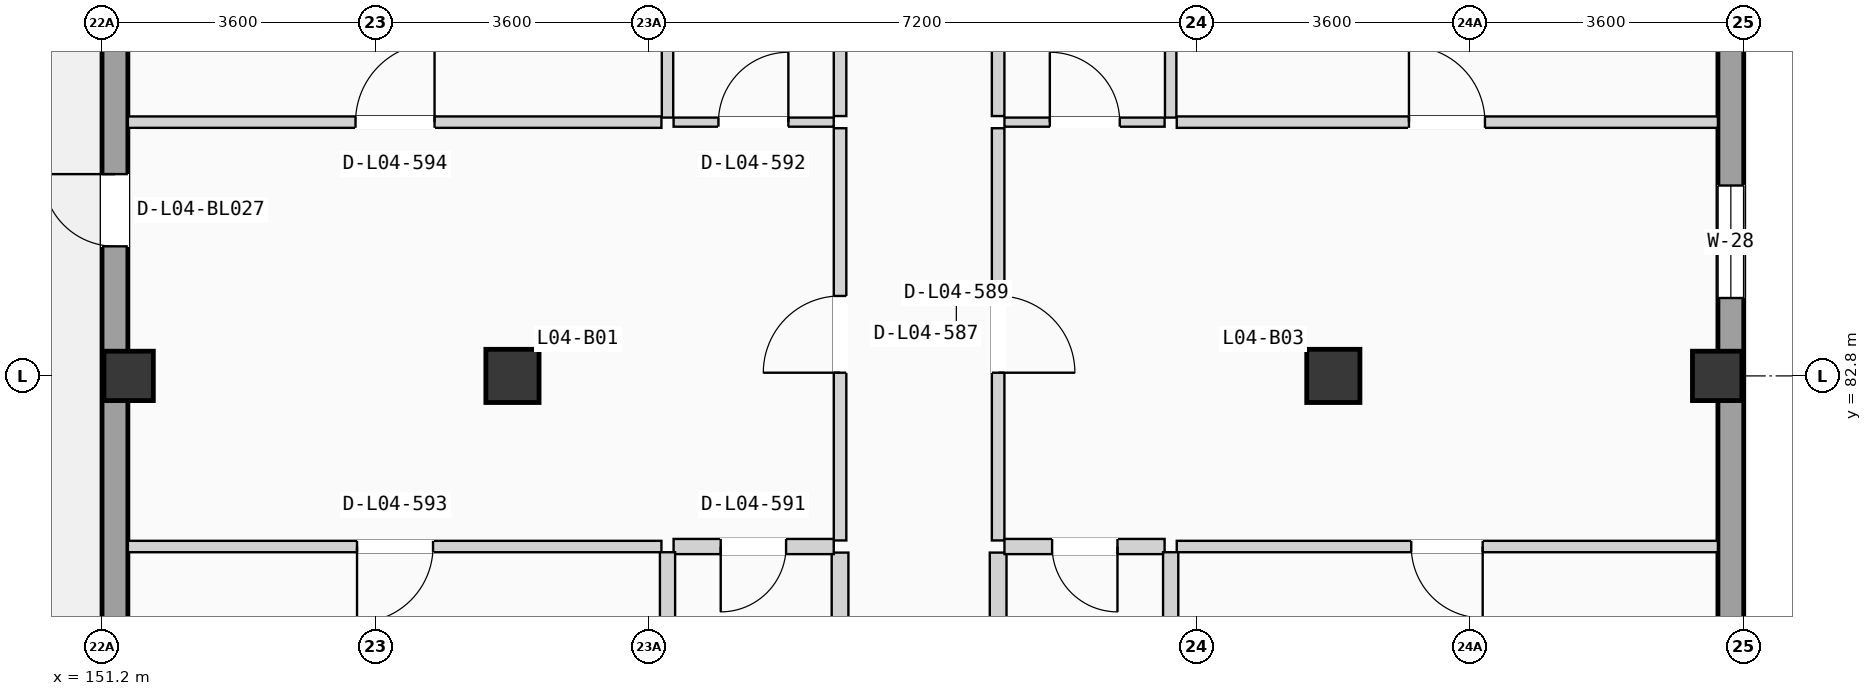
"""IFC4 building model, lengths in metres.
Left out: names, types, materials, properties, quantities, classifications, styles, units other than length and angle.
Written with IfcOpenShell. Run it as: python <this file> out.ifc"""

import sys

from ifc_helpers import new_model, si_unit, direction, frame, frame_2d, origin, origin_2d, place, context, subcontext, project, spatial, rectangle, extrude, element, fill, save


model = new_model("IFC4")
c1 = context("Model", 3, precision=1e-05, world=origin(), true_north=direction((0.0, 1.0)))
c2 = subcontext(c1, "Body", "Model", "MODEL_VIEW")
j1 = project(units=[si_unit("LENGTHUNIT", "METRE"), si_unit("PLANEANGLEUNIT", "RADIAN")], contexts=[c1])
p1 = place(None, origin())
s1 = spatial("IfcSite", under=j1, at=p1, CompositionType="ELEMENT")
p2 = place(p1, origin())
s2 = spatial("IfcBuilding", under=s1, at=p2, CompositionType="ELEMENT")
p3 = place(p2, frame((0.0, 0.0, 15.225)))
s3 = spatial("IfcBuildingStorey", under=s2, at=p3, CompositionType="ELEMENT", Elevation=15.225)
p4 = place(p3, frame((151.55, 82.8, 0.0), z_axis=(0.0, 0.0, 1.0), x_axis=(1.0, 0.0, 0.0)))
e1 = element("IfcColumn", 1, at=p4, inside=s3, PredefinedType="COLUMN", context=c2, shape_type="SweptSolid", body=[
    extrude(rectangle(XDim=0.65, YDim=0.65, at=origin_2d()), origin(), (0.0, 0.0, 1.0), 3.15),
])
for number, where, z_axis, x_axis in (
    (2, (156.6, 82.8, 0.0), (0.0, 0.0, 1.0), (1.0, 0.0, 0.0)),
    (3, (167.4, 82.8, 0.0), (0.0, 0.0, 1.0), (1.0, 0.0, 0.0)),
):
    element("IfcColumn", number, at=place(p3, frame(where, z_axis=z_axis, x_axis=x_axis)), inside=s3, PredefinedType="COLUMN", context=c2, shape_type="SweptSolid", body=[
        extrude(rectangle(XDim=0.7, YDim=0.7, at=origin_2d()), origin(), (0.0, 0.0, 1.0), 3.15),
    ])
p5 = place(p3, frame((172.45, 82.8, 0.0), z_axis=(0.0, 0.0, 1.0), x_axis=(1.0, 0.0, 0.0)))
e4 = element("IfcColumn", 4, at=p5, inside=s3, PredefinedType="COLUMN", context=c2, shape_type="SweptSolid", body=[
    extrude(rectangle(XDim=0.65, YDim=0.65, at=origin_2d()), origin(), (0.0, 0.0, 1.0), 3.15),
])
p6 = place(p3, frame((151.37, 68.74, 0.0), z_axis=(0.0, 0.0, 1.0), x_axis=(0.0, 1.0, 0.0)))
e5 = element("IfcWall", 5, at=p6, inside=s3, PredefinedType="SOLIDWALL", context=c2, shape_type="SweptSolid", body=[
    extrude(rectangle(XDim=49.72, YDim=0.34, at=frame_2d((24.86, 0.0))), origin(), (0.0, 0.0, 1.0), 2.89),
])
p7 = place(p6, frame((15.765, 0.0, 0.0)))
e6 = element("IfcOpeningElement", 6, at=p7, cuts=e5, PredefinedType="OPENING", context=c2, shape_type="SweptSolid", body=[
    extrude(rectangle(XDim=0.95, YDim=2.15, at=frame_2d((0.475, 1.075))), frame((0.0, 0.18, 0.0), z_axis=(0.0, -1.0, 0.0), x_axis=(1.0, 0.0, 0.0)), (0.0, 0.0, 1.0), 0.36),
])
p8 = place(p6, frame((8.823, 0.0, 0.555)))
e7 = element("IfcOpeningElement", 7, at=p8, cuts=e5, PredefinedType="OPENING", context=c2, shape_type="SweptSolid", body=[
    extrude(rectangle(XDim=1.35, YDim=1.65, at=frame_2d((0.675, 0.825))), frame((0.0, 0.18, 0.0), z_axis=(0.0, -1.0, 0.0), x_axis=(1.0, 0.0, 0.0)), (0.0, 0.0, 1.0), 0.36),
])
p9 = place(p6, frame((18.76, 0.0, 0.85)))
e8 = element("IfcOpeningElement", 8, at=p9, cuts=e5, PredefinedType="OPENING", context=c2, shape_type="SweptSolid", body=[
    extrude(rectangle(XDim=0.95, YDim=1.2, at=frame_2d((0.475, 0.6))), frame((0.0, 0.18, 0.0), z_axis=(0.0, -1.0, 0.0), x_axis=(1.0, 0.0, 0.0)), (0.0, 0.0, 1.0), 0.36),
])
p10 = place(p6, frame((32.345, 0.0, 0.0)))
e9 = element("IfcOpeningElement", 9, at=p10, cuts=e5, PredefinedType="OPENING", context=c2, shape_type="SweptSolid", body=[
    extrude(rectangle(XDim=1.08, YDim=2.18, at=frame_2d((0.54, 1.09))), frame((0.0, 0.18, 0.0), z_axis=(0.0, -1.0, 0.0), x_axis=(1.0, 0.0, 0.0)), (0.0, 0.0, 1.0), 0.36),
])
p11 = place(p6, frame((24.422, 0.0, 0.9)))
e10 = element("IfcOpeningElement", 10, at=p11, cuts=e5, PredefinedType="OPENING", context=c2, shape_type="SweptSolid", body=[
    extrude(rectangle(XDim=1.48, YDim=1.2, at=frame_2d((0.74, 0.6))), frame((0.0, 0.18, 0.0), z_axis=(0.0, -1.0, 0.0), x_axis=(1.0, 0.0, 0.0)), (0.0, 0.0, 1.0), 0.36),
])
p12 = place(p6, frame((38.455, 0.0, 0.855)))
e11 = element("IfcOpeningElement", 11, at=p12, cuts=e5, PredefinedType="OPENING", context=c2, shape_type="SweptSolid", body=[
    extrude(rectangle(XDim=1.48, YDim=1.35, at=frame_2d((0.74, 0.675))), frame((0.0, 0.18, 0.0), z_axis=(0.0, -1.0, 0.0), x_axis=(1.0, 0.0, 0.0)), (0.0, 0.0, 1.0), 0.36),
])
p13 = place(p3, frame((172.63, 68.74, 0.0), z_axis=(0.0, 0.0, 1.0), x_axis=(0.0, 1.0, 0.0)))
e12 = element("IfcWall", 12, at=p13, inside=s3, PredefinedType="SOLIDWALL", context=c2, shape_type="SweptSolid", body=[
    extrude(rectangle(XDim=49.72, YDim=0.34, at=frame_2d((24.86, 0.0))), origin(), (0.0, 0.0, 1.0), 2.89),
])
p14 = place(p13, frame((15.085, 0.0, 0.705)))
e13 = element("IfcOpeningElement", 13, at=p14, cuts=e12, PredefinedType="OPENING", context=c2, shape_type="SweptSolid", body=[
    extrude(rectangle(XDim=1.48, YDim=1.5, at=frame_2d((0.74, 0.75))), frame((0.0, 0.18, 0.0), z_axis=(0.0, -1.0, 0.0), x_axis=(1.0, 0.0, 0.0)), (0.0, 0.0, 1.0), 0.36),
])
p15 = place(p13, frame((8.758, 0.0, 0.555)))
e14 = element("IfcOpeningElement", 14, at=p15, cuts=e12, PredefinedType="OPENING", context=c2, shape_type="SweptSolid", body=[
    extrude(rectangle(XDim=1.48, YDim=1.65, at=frame_2d((0.74, 0.825))), frame((0.0, 0.18, 0.0), z_axis=(0.0, -1.0, 0.0), x_axis=(1.0, 0.0, 0.0)), (0.0, 0.0, 1.0), 0.36),
])
p16 = place(p13, frame((18.76, 0.0, 0.85)))
e15 = element("IfcOpeningElement", 15, at=p16, cuts=e12, PredefinedType="OPENING", context=c2, shape_type="SweptSolid", body=[
    extrude(rectangle(XDim=0.95, YDim=1.2, at=frame_2d((0.475, 0.6))), frame((0.0, 0.18, 0.0), z_axis=(0.0, -1.0, 0.0), x_axis=(1.0, 0.0, 0.0)), (0.0, 0.0, 1.0), 0.36),
])
p17 = place(p13, frame((31.26, 0.0, 0.9)))
e16 = element("IfcOpeningElement", 16, at=p17, cuts=e12, PredefinedType="OPENING", context=c2, shape_type="SweptSolid", body=[
    extrude(rectangle(XDim=1.6, YDim=1.2, at=frame_2d((0.8, 0.6))), frame((0.0, 0.18, 0.0), z_axis=(0.0, -1.0, 0.0), x_axis=(1.0, 0.0, 0.0)), (0.0, 0.0, 1.0), 0.36),
])
p18 = place(p13, frame((24.362, 0.0, 0.855)))
e17 = element("IfcOpeningElement", 17, at=p18, cuts=e12, PredefinedType="OPENING", context=c2, shape_type="SweptSolid", body=[
    extrude(rectangle(XDim=1.6, YDim=1.35, at=frame_2d((0.8, 0.675))), frame((0.0, 0.18, 0.0), z_axis=(0.0, -1.0, 0.0), x_axis=(1.0, 0.0, 0.0)), (0.0, 0.0, 1.0), 0.36),
])
p19 = place(p13, frame((38.395, 0.0, 0.705)))
e18 = element("IfcOpeningElement", 18, at=p19, cuts=e12, PredefinedType="OPENING", context=c2, shape_type="SweptSolid", body=[
    extrude(rectangle(XDim=1.6, YDim=1.5, at=frame_2d((0.8, 0.75))), frame((0.0, 0.18, 0.0), z_axis=(0.0, -1.0, 0.0), x_axis=(1.0, 0.0, 0.0)), (0.0, 0.0, 1.0), 0.36),
])
p20 = place(p3, frame((160.91, 80.635, 0.0), z_axis=(0.0, 0.0, 1.0), x_axis=(0.0, 1.0, 0.0)))
e19 = element("IfcWall", 19, at=p20, inside=s3, PredefinedType="PARTITIONING", context=c2, shape_type="SweptSolid", body=[
    extrude(rectangle(XDim=5.424, YDim=0.165, at=frame_2d((2.712, 0.0))), origin(), (0.0, 0.0, 1.0), 2.87),
])
p21 = place(p20, frame((2.207, 0.0, 0.0)))
e20 = element("IfcOpeningElement", 20, at=p21, cuts=e19, PredefinedType="OPENING", context=c2, shape_type="SweptSolid", body=[
    extrude(rectangle(XDim=1.01, YDim=2.11, at=frame_2d((0.505, 1.055))), frame((0.0, 0.093, 0.0), z_axis=(0.0, -1.0, 0.0), x_axis=(1.0, 0.0, 0.0)), (0.0, 0.0, 1.0), 0.185),
])
p22 = place(p3, frame((160.91, 76.0, 0.0), z_axis=(0.0, 0.0, 1.0), x_axis=(0.0, 1.0, 0.0)))
e21 = element("IfcWall", 21, at=p22, inside=s3, PredefinedType="PLUMBINGWALL", context=c2, shape_type="SweptSolid", body=[
    extrude(rectangle(XDim=4.475, YDim=0.22, at=frame_2d((2.238, 0.0))), origin(), (0.0, 0.0, 1.0), 2.87),
])
p23 = place(p3, frame((160.91, 86.219, 0.0), z_axis=(0.0, 0.0, 1.0), x_axis=(0.0, 1.0, 0.0)))
e22 = element("IfcWall", 22, at=p23, inside=s3, PredefinedType="PARTITIONING", context=c2, shape_type="SweptSolid", body=[
    extrude(rectangle(XDim=4.475, YDim=0.165, at=frame_2d((2.238, 0.0))), origin(), (0.0, 0.0, 1.0), 2.87),
])
p24 = place(p3, frame((162.99, 80.635, 0.0), z_axis=(0.0, 0.0, 1.0), x_axis=(0.0, 1.0, 0.0)))
e23 = element("IfcWall", 23, at=p24, inside=s3, PredefinedType="PARTITIONING", context=c2, shape_type="SweptSolid", body=[
    extrude(rectangle(XDim=5.424, YDim=0.165, at=frame_2d((2.712, 0.0))), origin(), (0.0, 0.0, 1.0), 2.87),
])
p25 = place(p24, frame((2.207, 0.0, 0.0)))
e24 = element("IfcOpeningElement", 24, at=p25, cuts=e23, PredefinedType="OPENING", context=c2, shape_type="SweptSolid", body=[
    extrude(rectangle(XDim=1.01, YDim=2.11, at=frame_2d((0.505, 1.055))), frame((0.0, 0.093, 0.0), z_axis=(0.0, -1.0, 0.0), x_axis=(1.0, 0.0, 0.0)), (0.0, 0.0, 1.0), 0.185),
])
p26 = place(p3, frame((162.99, 75.975, 0.0), z_axis=(0.0, 0.0, 1.0), x_axis=(0.0, 1.0, 0.0)))
e25 = element("IfcWall", 25, at=p26, inside=s3, PredefinedType="PLUMBINGWALL", context=c2, shape_type="SweptSolid", body=[
    extrude(rectangle(XDim=4.5, YDim=0.22, at=frame_2d((2.25, 0.0))), origin(), (0.0, 0.0, 1.0), 2.87),
])
p27 = place(p3, frame((162.99, 86.219, 0.0), z_axis=(0.0, 0.0, 1.0), x_axis=(0.0, 1.0, 0.0)))
e26 = element("IfcWall", 26, at=p27, inside=s3, PredefinedType="PARTITIONING", context=c2, shape_type="SweptSolid", body=[
    extrude(rectangle(XDim=4.475, YDim=0.165, at=frame_2d((2.238, 0.0))), origin(), (0.0, 0.0, 1.0), 2.87),
])
p28 = place(p3, frame((158.72, 80.555, 0.0), z_axis=(0.0, 0.0, 1.0), x_axis=(1.0, 0.0, 0.0)))
e27 = element("IfcWall", 27, at=p28, inside=s3, PredefinedType="PLUMBINGWALL", context=c2, shape_type="SweptSolid", body=[
    extrude(rectangle(XDim=2.107, YDim=0.2, at=frame_2d((1.053, 0.0))), origin(), (0.0, 0.0, 1.0), 2.87),
])
p29 = place(p28, frame((0.62, 0.0, 0.0)))
e28 = element("IfcOpeningElement", 28, at=p29, cuts=e27, PredefinedType="OPENING", context=c2, shape_type="SweptSolid", body=[
    extrude(rectangle(XDim=0.86, YDim=2.0, at=frame_2d((0.43, 1.0))), frame((0.0, 0.11, 0.0), z_axis=(0.0, -1.0, 0.0), x_axis=(1.0, 0.0, 0.0)), (0.0, 0.0, 1.0), 0.22),
])
p30 = place(p3, frame((158.72, 86.139, 0.0), z_axis=(0.0, 0.0, 1.0), x_axis=(1.0, 0.0, 0.0)))
e29 = element("IfcWall", 29, at=p30, inside=s3, PredefinedType="PARTITIONING", context=c2, shape_type="SweptSolid", body=[
    extrude(rectangle(XDim=2.107, YDim=0.12, at=frame_2d((1.053, 0.0))), origin(), (0.0, 0.0, 1.0), 2.87),
])
p31 = place(p30, frame((0.59, 0.0, 0.0)))
e30 = element("IfcOpeningElement", 30, at=p31, cuts=e29, PredefinedType="OPENING", context=c2, shape_type="SweptSolid", body=[
    extrude(rectangle(XDim=0.92, YDim=2.02, at=frame_2d((0.46, 1.01))), frame((0.0, 0.07, 0.0), z_axis=(0.0, -1.0, 0.0), x_axis=(1.0, 0.0, 0.0)), (0.0, 0.0, 1.0), 0.14),
])
p32 = place(p3, frame((151.54, 80.555, 0.0), z_axis=(0.0, 0.0, 1.0), x_axis=(1.0, 0.0, 0.0)))
e31 = element("IfcWall", 31, at=p32, inside=s3, PredefinedType="PARTITIONING", context=c2, shape_type="SweptSolid", body=[
    extrude(rectangle(XDim=7.02, YDim=0.15, at=frame_2d((3.51, 0.0))), origin(), (0.0, 0.0, 1.0), 2.87),
])
p33 = place(p32, frame((3.015, 0.0, 0.0)))
e32 = element("IfcOpeningElement", 32, at=p33, cuts=e31, PredefinedType="OPENING", context=c2, shape_type="SweptSolid", body=[
    extrude(rectangle(XDim=1.0, YDim=2.06, at=frame_2d((0.5, 1.03))), frame((0.0, 0.085, 0.0), z_axis=(0.0, -1.0, 0.0), x_axis=(1.0, 0.0, 0.0)), (0.0, 0.0, 1.0), 0.17),
])
p34 = place(p3, frame((151.54, 86.139, 0.0), z_axis=(0.0, 0.0, 1.0), x_axis=(1.0, 0.0, 0.0)))
e33 = element("IfcWall", 33, at=p34, inside=s3, PredefinedType="PARTITIONING", context=c2, shape_type="SweptSolid", body=[
    extrude(rectangle(XDim=7.02, YDim=0.15, at=frame_2d((3.51, 0.0))), origin(), (0.0, 0.0, 1.0), 2.87),
])
p35 = place(p34, frame((2.995, 0.0, 0.0)))
e34 = element("IfcOpeningElement", 34, at=p35, cuts=e33, PredefinedType="OPENING", context=c2, shape_type="SweptSolid", body=[
    extrude(rectangle(XDim=1.04, YDim=2.08, at=frame_2d((0.52, 1.04))), frame((0.0, 0.085, 0.0), z_axis=(0.0, -1.0, 0.0), x_axis=(1.0, 0.0, 0.0)), (0.0, 0.0, 1.0), 0.17),
])
p36 = place(p3, frame((158.64, 76.0, 0.0), z_axis=(0.0, 0.0, 1.0), x_axis=(0.0, 1.0, 0.0)))
e35 = element("IfcWall", 35, at=p36, inside=s3, PredefinedType="PLUMBINGWALL", context=c2, shape_type="SweptSolid", body=[
    extrude(rectangle(XDim=4.48, YDim=0.2, at=frame_2d((2.24, 0.0))), origin(), (0.0, 0.0, 1.0), 2.87),
])
p37 = place(p3, frame((158.64, 86.199, 0.0), z_axis=(0.0, 0.0, 1.0), x_axis=(0.0, 1.0, 0.0)))
e36 = element("IfcWall", 36, at=p37, inside=s3, PredefinedType="PARTITIONING", context=c2, shape_type="SweptSolid", body=[
    extrude(rectangle(XDim=4.495, YDim=0.15, at=frame_2d((2.248, 0.0))), origin(), (0.0, 0.0, 1.0), 2.87),
])
p38 = place(p3, frame((163.073, 80.555, 0.0), z_axis=(0.0, 0.0, 1.0), x_axis=(1.0, 0.0, 0.0)))
e37 = element("IfcWall", 37, at=p38, inside=s3, PredefinedType="PLUMBINGWALL", context=c2, shape_type="SweptSolid", body=[
    extrude(rectangle(XDim=2.107, YDim=0.2, at=frame_2d((1.053, 0.0))), origin(), (0.0, 0.0, 1.0), 2.87),
])
p39 = place(p38, frame((0.627, 0.0, 0.0)))
e38 = element("IfcOpeningElement", 38, at=p39, cuts=e37, PredefinedType="OPENING", context=c2, shape_type="SweptSolid", body=[
    extrude(rectangle(XDim=0.86, YDim=2.0, at=frame_2d((0.43, 1.0))), frame((0.0, 0.11, 0.0), z_axis=(0.0, -1.0, 0.0), x_axis=(1.0, 0.0, 0.0)), (0.0, 0.0, 1.0), 0.22),
])
p40 = place(p3, frame((163.073, 86.139, 0.0), z_axis=(0.0, 0.0, 1.0), x_axis=(1.0, 0.0, 0.0)))
e39 = element("IfcWall", 39, at=p40, inside=s3, PredefinedType="PARTITIONING", context=c2, shape_type="SweptSolid", body=[
    extrude(rectangle(XDim=2.107, YDim=0.12, at=frame_2d((1.053, 0.0))), origin(), (0.0, 0.0, 1.0), 2.87),
])
p41 = place(p40, frame((0.597, 0.0, 0.0)))
e40 = element("IfcOpeningElement", 40, at=p41, cuts=e39, PredefinedType="OPENING", context=c2, shape_type="SweptSolid", body=[
    extrude(rectangle(XDim=0.92, YDim=2.02, at=frame_2d((0.46, 1.01))), frame((0.0, 0.07, 0.0), z_axis=(0.0, -1.0, 0.0), x_axis=(1.0, 0.0, 0.0)), (0.0, 0.0, 1.0), 0.14),
])
p42 = place(p3, frame((165.34, 80.555, 0.0), z_axis=(0.0, 0.0, 1.0), x_axis=(1.0, 0.0, 0.0)))
e41 = element("IfcWall", 41, at=p42, inside=s3, PredefinedType="PARTITIONING", context=c2, shape_type="SweptSolid", body=[
    extrude(rectangle(XDim=7.12, YDim=0.15, at=frame_2d((3.56, 0.0))), origin(), (0.0, 0.0, 1.0), 2.87),
])
p43 = place(p42, frame((3.085, 0.0, 0.0)))
e42 = element("IfcOpeningElement", 42, at=p43, cuts=e41, PredefinedType="OPENING", context=c2, shape_type="SweptSolid", body=[
    extrude(rectangle(XDim=0.94, YDim=2.06, at=frame_2d((0.47, 1.03))), frame((0.0, 0.085, 0.0), z_axis=(0.0, -1.0, 0.0), x_axis=(1.0, 0.0, 0.0)), (0.0, 0.0, 1.0), 0.17),
])
p44 = place(p3, frame((165.34, 86.139, 0.0), z_axis=(0.0, 0.0, 1.0), x_axis=(1.0, 0.0, 0.0)))
e43 = element("IfcWall", 43, at=p44, inside=s3, PredefinedType="PARTITIONING", context=c2, shape_type="SweptSolid", body=[
    extrude(rectangle(XDim=7.12, YDim=0.15, at=frame_2d((3.56, 0.0))), origin(), (0.0, 0.0, 1.0), 2.87),
])
p45 = place(p44, frame((3.055, 0.0, 0.0)))
e44 = element("IfcOpeningElement", 44, at=p45, cuts=e43, PredefinedType="OPENING", context=c2, shape_type="SweptSolid", body=[
    extrude(rectangle(XDim=1.0, YDim=2.06, at=frame_2d((0.5, 1.03))), frame((0.0, 0.085, 0.0), z_axis=(0.0, -1.0, 0.0), x_axis=(1.0, 0.0, 0.0)), (0.0, 0.0, 1.0), 0.17),
])
p46 = place(p3, frame((165.26, 75.975, 0.0), z_axis=(0.0, 0.0, 1.0), x_axis=(0.0, 1.0, 0.0)))
e45 = element("IfcWall", 45, at=p46, inside=s3, PredefinedType="PLUMBINGWALL", context=c2, shape_type="SweptSolid", body=[
    extrude(rectangle(XDim=4.505, YDim=0.2, at=frame_2d((2.252, 0.0))), origin(), (0.0, 0.0, 1.0), 2.87),
])
p47 = place(p3, frame((165.26, 86.199, 0.0), z_axis=(0.0, 0.0, 1.0), x_axis=(0.0, 1.0, 0.0)))
e46 = element("IfcWall", 46, at=p47, inside=s3, PredefinedType="PARTITIONING", context=c2, shape_type="SweptSolid", body=[
    extrude(rectangle(XDim=4.495, YDim=0.15, at=frame_2d((2.248, 0.0))), origin(), (0.0, 0.0, 1.0), 2.87),
])
p48 = place(p7, origin())
e47 = element("IfcDoor", 47, at=p48, inside=s3, OperationType="SINGLE_SWING_RIGHT", PredefinedType="DOOR", context=c2, shape_type="SweptSolid", body=[
    extrude(rectangle(XDim=0.95, YDim=2.15, at=frame_2d((0.475, 1.075))), frame((0.0, 0.025, 0.0), z_axis=(0.0, -1.0, 0.0), x_axis=(1.0, 0.0, 0.0)), (0.0, 0.0, 1.0), 0.05),
])
fill(e6, e47)
p49 = place(p14, origin())
e48 = element("IfcWindow", 48, at=p49, inside=s3, PartitioningType="SINGLE_PANEL", PredefinedType="WINDOW", context=c2, shape_type="SweptSolid", body=[
    extrude(rectangle(XDim=1.48, YDim=1.5, at=frame_2d((0.74, 0.75))), frame((0.0, 0.03, 0.0), z_axis=(0.0, -1.0, 0.0), x_axis=(1.0, 0.0, 0.0)), (0.0, 0.0, 1.0), 0.06),
])
fill(e13, e48)
p50 = place(p21, origin())
e49 = element("IfcDoor", 49, at=p50, inside=s3, OperationType="SINGLE_SWING_LEFT", PredefinedType="DOOR", context=c2, shape_type="SweptSolid", body=[
    extrude(rectangle(XDim=1.01, YDim=2.11, at=frame_2d((0.505, 1.055))), frame((0.0, 0.025, 0.0), z_axis=(0.0, -1.0, 0.0), x_axis=(1.0, 0.0, 0.0)), (0.0, 0.0, 1.0), 0.05),
])
fill(e20, e49)
p51 = place(p25, frame((1.01, 0.0, 0.0), z_axis=(0.0, 0.0, 1.0), x_axis=(-1.0, 0.0, 0.0)))
e50 = element("IfcDoor", 50, at=p51, inside=s3, OperationType="SINGLE_SWING_LEFT", PredefinedType="DOOR", context=c2, shape_type="SweptSolid", body=[
    extrude(rectangle(XDim=1.01, YDim=2.11, at=frame_2d((0.505, 1.055))), frame((0.0, 0.025, 0.0), z_axis=(0.0, -1.0, 0.0), x_axis=(1.0, 0.0, 0.0)), (0.0, 0.0, 1.0), 0.05),
])
fill(e24, e50)
p52 = place(p29, frame((0.86, 0.0, 0.0), z_axis=(0.0, 0.0, 1.0), x_axis=(-1.0, 0.0, 0.0)))
e51 = element("IfcDoor", 51, at=p52, inside=s3, OperationType="SINGLE_SWING_LEFT", PredefinedType="DOOR", context=c2, shape_type="SweptSolid", body=[
    extrude(rectangle(XDim=0.86, YDim=2.0, at=frame_2d((0.43, 1.0))), frame((0.0, 0.025, 0.0), z_axis=(0.0, -1.0, 0.0), x_axis=(1.0, 0.0, 0.0)), (0.0, 0.0, 1.0), 0.05),
])
fill(e28, e51)
p53 = place(p31, origin())
e52 = element("IfcDoor", 52, at=p53, inside=s3, OperationType="SINGLE_SWING_RIGHT", PredefinedType="DOOR", context=c2, shape_type="SweptSolid", body=[
    extrude(rectangle(XDim=0.92, YDim=2.02, at=frame_2d((0.46, 1.01))), frame((0.0, 0.025, 0.0), z_axis=(0.0, -1.0, 0.0), x_axis=(1.0, 0.0, 0.0)), (0.0, 0.0, 1.0), 0.05),
])
fill(e30, e52)
p54 = place(p33, frame((1.0, 0.0, 0.0), z_axis=(0.0, 0.0, 1.0), x_axis=(-1.0, 0.0, 0.0)))
e53 = element("IfcDoor", 53, at=p54, inside=s3, OperationType="SINGLE_SWING_LEFT", PredefinedType="DOOR", context=c2, shape_type="SweptSolid", body=[
    extrude(rectangle(XDim=1.0, YDim=2.06, at=frame_2d((0.5, 1.03))), frame((0.0, 0.025, 0.0), z_axis=(0.0, -1.0, 0.0), x_axis=(1.0, 0.0, 0.0)), (0.0, 0.0, 1.0), 0.05),
])
fill(e32, e53)
p55 = place(p35, origin())
e54 = element("IfcDoor", 54, at=p55, inside=s3, OperationType="SINGLE_SWING_RIGHT", PredefinedType="DOOR", context=c2, shape_type="SweptSolid", body=[
    extrude(rectangle(XDim=1.04, YDim=2.08, at=frame_2d((0.52, 1.04))), frame((0.0, 0.025, 0.0), z_axis=(0.0, -1.0, 0.0), x_axis=(1.0, 0.0, 0.0)), (0.0, 0.0, 1.0), 0.05),
])
fill(e34, e54)
p56 = place(p39, frame((0.86, 0.0, 0.0), z_axis=(0.0, 0.0, 1.0), x_axis=(-1.0, 0.0, 0.0)))
e55 = element("IfcDoor", 55, at=p56, inside=s3, OperationType="SINGLE_SWING_RIGHT", PredefinedType="DOOR", context=c2, shape_type="SweptSolid", body=[
    extrude(rectangle(XDim=0.86, YDim=2.0, at=frame_2d((0.43, 1.0))), frame((0.0, 0.025, 0.0), z_axis=(0.0, -1.0, 0.0), x_axis=(1.0, 0.0, 0.0)), (0.0, 0.0, 1.0), 0.05),
])
fill(e38, e55)
p57 = place(p41, origin())
e56 = element("IfcDoor", 56, at=p57, inside=s3, OperationType="SINGLE_SWING_LEFT", PredefinedType="DOOR", context=c2, shape_type="SweptSolid", body=[
    extrude(rectangle(XDim=0.92, YDim=2.02, at=frame_2d((0.46, 1.01))), frame((0.0, 0.025, 0.0), z_axis=(0.0, -1.0, 0.0), x_axis=(1.0, 0.0, 0.0)), (0.0, 0.0, 1.0), 0.05),
])
fill(e40, e56)
p58 = place(p43, frame((0.94, 0.0, 0.0), z_axis=(0.0, 0.0, 1.0), x_axis=(-1.0, 0.0, 0.0)))
e57 = element("IfcDoor", 57, at=p58, inside=s3, OperationType="SINGLE_SWING_RIGHT", PredefinedType="DOOR", context=c2, shape_type="SweptSolid", body=[
    extrude(rectangle(XDim=0.94, YDim=2.06, at=frame_2d((0.47, 1.03))), frame((0.0, 0.025, 0.0), z_axis=(0.0, -1.0, 0.0), x_axis=(1.0, 0.0, 0.0)), (0.0, 0.0, 1.0), 0.05),
])
fill(e42, e57)
p59 = place(p45, origin())
e58 = element("IfcDoor", 58, at=p59, inside=s3, OperationType="SINGLE_SWING_LEFT", PredefinedType="DOOR", context=c2, shape_type="SweptSolid", body=[
    extrude(rectangle(XDim=1.0, YDim=2.06, at=frame_2d((0.5, 1.03))), frame((0.0, 0.025, 0.0), z_axis=(0.0, -1.0, 0.0), x_axis=(1.0, 0.0, 0.0)), (0.0, 0.0, 1.0), 0.05),
])
fill(e44, e58)
save(model, sys.argv[1])
